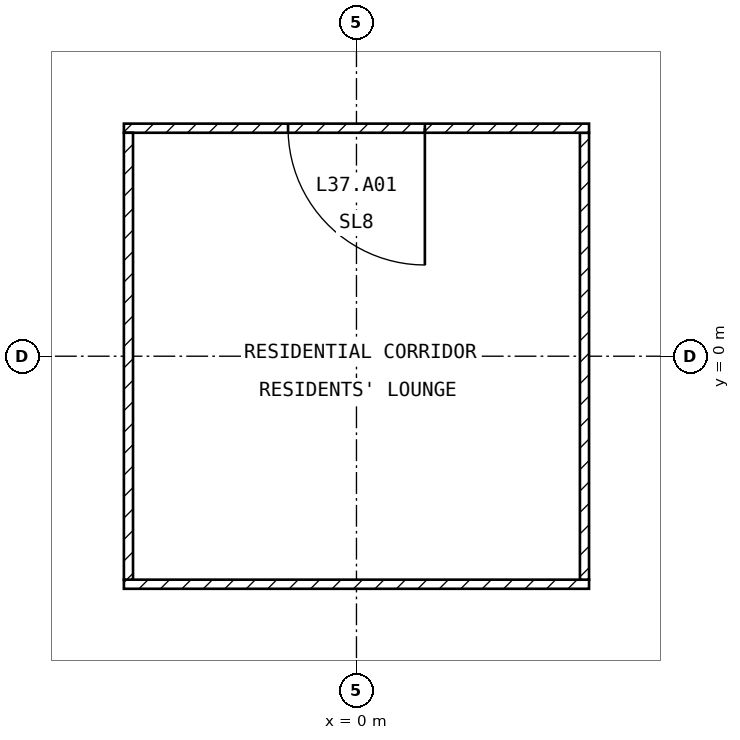
"""IFC4 building model, lengths in metres.
Left out: names, types, materials, properties, quantities, classifications, styles, units other than length and angle.
Written with IfcOpenShell. Run it as: python <this file> out.ifc"""

import sys

from ifc_helpers import new_model, si_unit, direction, frame, frame_2d, origin, place, context, subcontext, project, spatial, rectangle, extrude, element, fill, save


model = new_model("IFC4")
c1 = context("Model", 3, precision=1e-05, world=origin(), true_north=direction((0.0, 1.0)))
c2 = subcontext(c1, "Body", "Model", "MODEL_VIEW")
j1 = project(units=[si_unit("LENGTHUNIT", "METRE"), si_unit("PLANEANGLEUNIT", "RADIAN")], contexts=[c1])
p1 = place(None, origin())
s1 = spatial("IfcSite", under=j1, at=p1, CompositionType="ELEMENT")
p2 = place(p1, origin())
s2 = spatial("IfcBuilding", under=s1, at=p2, CompositionType="ELEMENT")
p3 = place(p2, frame((0.0, 0.0, 151.4)))
s3 = spatial("IfcBuildingStorey", under=s2, at=p3, CompositionType="ELEMENT", Elevation=151.4)
p4 = place(p3, frame((-3.06, -3.0, 0.0), z_axis=(0.0, 0.0, 1.0), x_axis=(1.0, 0.0, 0.0)))
e1 = element("IfcWall", 1, at=p4, inside=s3, PredefinedType="PARTITIONING", context=c2, shape_type="SweptSolid", body=[
    extrude(rectangle(XDim=6.12, YDim=0.12, at=frame_2d((3.06, 0.0))), origin(), (0.0, 0.0, 1.0), 3.2),
])
p5 = place(p3, frame((3.0, -2.94, 0.0), z_axis=(0.0, 0.0, 1.0), x_axis=(0.0, 1.0, 0.0)))
e2 = element("IfcWall", 2, at=p5, inside=s3, PredefinedType="PARTITIONING", context=c2, shape_type="SweptSolid", body=[
    extrude(rectangle(XDim=5.88, YDim=0.12, at=frame_2d((2.94, 0.0))), origin(), (0.0, 0.0, 1.0), 3.2),
])
p6 = place(p3, frame((3.06, 3.0, 0.0), z_axis=(0.0, 0.0, 1.0), x_axis=(-1.0, 0.0, 0.0)))
e3 = element("IfcWall", 3, at=p6, inside=s3, PredefinedType="PARTITIONING", context=c2, shape_type="SweptSolid", body=[
    extrude(rectangle(XDim=6.12, YDim=0.12, at=frame_2d((3.06, 0.0))), origin(), (0.0, 0.0, 1.0), 3.2),
])
p7 = place(p6, frame((2.16, 0.0, 0.0)))
e4 = element("IfcOpeningElement", 4, at=p7, cuts=e3, PredefinedType="OPENING", context=c2, shape_type="SweptSolid", body=[
    extrude(rectangle(XDim=1.8, YDim=2.1, at=frame_2d((0.9, 1.05))), frame((0.0, 0.07, 0.0), z_axis=(0.0, -1.0, 0.0), x_axis=(1.0, 0.0, 0.0)), (0.0, 0.0, 1.0), 0.14),
])
p8 = place(p3, frame((-3.0, 2.94, 0.0), z_axis=(0.0, 0.0, 1.0), x_axis=(0.0, -1.0, 0.0)))
e5 = element("IfcWall", 5, at=p8, inside=s3, PredefinedType="PARTITIONING", context=c2, shape_type="SweptSolid", body=[
    extrude(rectangle(XDim=5.88, YDim=0.12, at=frame_2d((2.94, 0.0))), origin(), (0.0, 0.0, 1.0), 3.2),
])
p9 = place(p7, origin())
e6 = element("IfcDoor", 6, at=p9, inside=s3, OperationType="SINGLE_SWING_LEFT", PredefinedType="DOOR", context=c2, shape_type="SweptSolid", body=[
    extrude(rectangle(XDim=1.8, YDim=2.1, at=frame_2d((0.9, 1.05))), frame((0.0, 0.025, 0.0), z_axis=(0.0, -1.0, 0.0), x_axis=(1.0, 0.0, 0.0)), (0.0, 0.0, 1.0), 0.05),
])
fill(e4, e6)
save(model, sys.argv[1])
